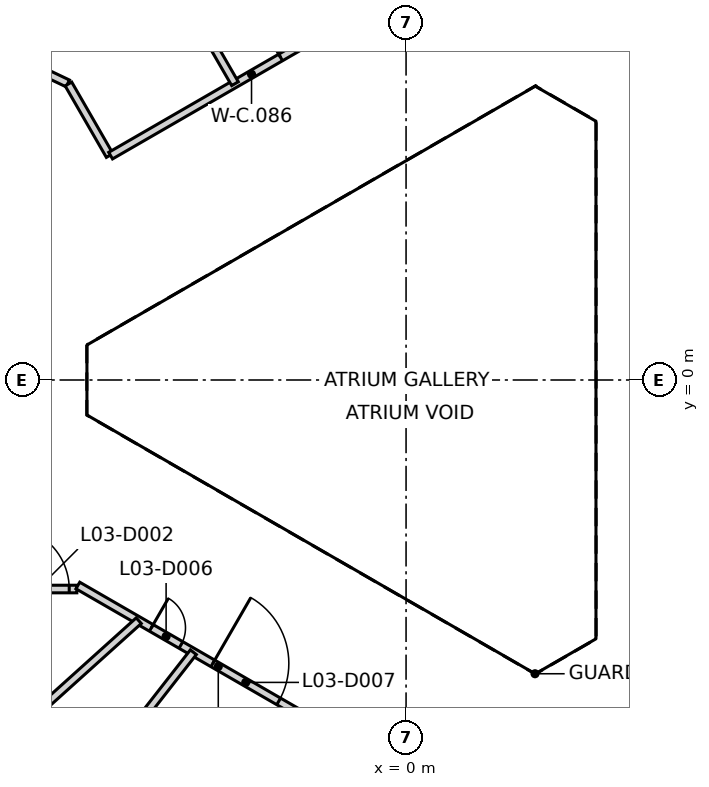
"""IFC4 building model, lengths in metres.
Left out: names, types, materials, properties, quantities, classifications, styles, units other than length and angle.
Written with IfcOpenShell. Run it as: python <this file> out.ifc"""

import sys

from ifc_helpers import new_model, si_unit, direction, frame, frame_2d, origin, place, context, subcontext, project, spatial, rectangle, extrude, element, fill, save


model = new_model("IFC4")
c1 = context("Model", 3, precision=1e-05, world=origin(), true_north=direction((0.0, 1.0)))
c2 = subcontext(c1, "Body", "Model", "MODEL_VIEW")
j1 = project(units=[si_unit("LENGTHUNIT", "METRE"), si_unit("PLANEANGLEUNIT", "RADIAN")], contexts=[c1])
p1 = place(None, origin())
s1 = spatial("IfcSite", under=j1, at=p1, CompositionType="ELEMENT")
p2 = place(p1, origin())
s2 = spatial("IfcBuilding", under=s1, at=p2, CompositionType="ELEMENT")
p3 = place(p2, frame((0.0, 0.0, 19.5)))
s3 = spatial("IfcBuildingStorey", under=s2, at=p3, CompositionType="ELEMENT", Elevation=19.5)
p4 = place(p3, frame((10.42, 6.498, 0.0), z_axis=(0.0, 0.0, 1.0), x_axis=(-0.866021906294, 0.500006057782, 0.0)))
e1 = element("IfcWall", 1, at=p4, inside=s3, PredefinedType="SHEAR", context=c2, shape_type="SweptSolid", body=[
    extrude(rectangle(XDim=11.55, YDim=0.25, at=frame_2d((5.775, 0.0))), origin(), (0.0, 0.0, 1.0), 4.55),
])
p5 = place(p4, frame((10.025, 0.0, 0.0)))
e2 = element("IfcOpeningElement", 2, at=p5, cuts=e1, PredefinedType="OPENING", context=c2, shape_type="SweptSolid", body=[
    extrude(rectangle(XDim=1.2, YDim=2.1, at=frame_2d((0.6, 1.05))), frame((0.0, 0.135, 0.0), z_axis=(0.0, -1.0, 0.0), x_axis=(1.0, 0.0, 0.0)), (0.0, 0.0, 1.0), 0.27),
])
p6 = place(p4, frame((8.725, 0.0, 0.0)))
e3 = element("IfcOpeningElement", 3, at=p6, cuts=e1, PredefinedType="OPENING", context=c2, shape_type="SweptSolid", body=[
    extrude(rectangle(XDim=1.2, YDim=2.1, at=frame_2d((0.6, 1.05))), frame((0.0, 0.135, 0.0), z_axis=(0.0, -1.0, 0.0), x_axis=(1.0, 0.0, 0.0)), (0.0, 0.0, 1.0), 0.27),
])
p7 = place(p3, frame((0.417, -12.273, 0.0), z_axis=(0.0, 0.0, 1.0), x_axis=(0.866021906294, 0.500006057782, 0.0)))
e4 = element("IfcWall", 4, at=p7, inside=s3, PredefinedType="SHEAR", context=c2, shape_type="SweptSolid", body=[
    extrude(rectangle(XDim=11.55, YDim=0.25, at=frame_2d((5.775, 0.0))), origin(), (0.0, 0.0, 1.0), 4.55),
])
p8 = place(p7, frame((10.025, 0.0, 0.0)))
e5 = element("IfcOpeningElement", 5, at=p8, cuts=e4, PredefinedType="OPENING", context=c2, shape_type="SweptSolid", body=[
    extrude(rectangle(XDim=1.2, YDim=2.1, at=frame_2d((0.6, 1.05))), frame((0.0, 0.135, 0.0), z_axis=(0.0, -1.0, 0.0), x_axis=(1.0, 0.0, 0.0)), (0.0, 0.0, 1.0), 0.27),
])
p9 = place(p7, frame((8.725, 0.0, 0.0)))
e6 = element("IfcOpeningElement", 6, at=p9, cuts=e4, PredefinedType="OPENING", context=c2, shape_type="SweptSolid", body=[
    extrude(rectangle(XDim=1.2, YDim=2.1, at=frame_2d((0.6, 1.05))), frame((0.0, 0.135, 0.0), z_axis=(0.0, -1.0, 0.0), x_axis=(1.0, 0.0, 0.0)), (0.0, 0.0, 1.0), 0.27),
])
p10 = place(p3, frame((-10.652, -5.5, 0.0), z_axis=(0.0, 0.0, 1.0), x_axis=(1.0, 0.0, 0.0)))
e7 = element("IfcWall", 7, at=p10, inside=s3, PredefinedType="PARTITIONING", context=c2, shape_type="SweptSolid", body=[
    extrude(rectangle(XDim=1.989, YDim=0.2, at=frame_2d((0.995, 0.0))), origin(), (0.0, 0.0, 1.0), 4.55),
])
p11 = place(p10, frame((0.139, 0.0, 0.0)))
e8 = element("IfcOpeningElement", 8, at=p11, cuts=e7, PredefinedType="OPENING", context=c2, shape_type="SweptSolid", body=[
    extrude(rectangle(XDim=1.65, YDim=2.1, at=frame_2d((0.825, 1.05))), frame((0.0, 0.11, 0.0), z_axis=(0.0, -1.0, 0.0), x_axis=(1.0, 0.0, 0.0)), (0.0, 0.0, 1.0), 0.22),
])
p12 = place(p3, frame((-10.082, 8.365, 0.0), z_axis=(0.0, 0.0, 1.0), x_axis=(0.903129261813, -0.429368765116, 0.0)))
e9 = element("IfcWall", 9, at=p12, inside=s3, PredefinedType="PARTITIONING", context=c2, shape_type="SweptSolid", body=[
    extrude(rectangle(XDim=1.309, YDim=0.2, at=frame_2d((0.654, 0.0))), origin(), (0.0, 0.0, 1.0), 4.55),
])
p13 = place(p3, frame((-8.884, 7.789, 0.0), z_axis=(0.0, 0.0, 1.0), x_axis=(0.49942731159, -0.866355793215, 0.0)))
e10 = element("IfcWall", 10, at=p13, inside=s3, PredefinedType="PARTITIONING", context=c2, shape_type="SweptSolid", body=[
    extrude(rectangle(XDim=2.172, YDim=0.2, at=frame_2d((1.086, 0.0))), origin(), (0.0, 0.0, 1.0), 4.55),
])
p14 = place(p3, frame((-8.636, -5.407, 0.0), z_axis=(0.0, 0.0, 1.0), x_axis=(0.86608314541, -0.499899975231, 0.0)))
e11 = element("IfcWall", 11, at=p14, inside=s3, PredefinedType="PARTITIONING", context=c2, shape_type="SweptSolid", body=[
    extrude(rectangle(XDim=8.532, YDim=0.2, at=frame_2d((4.266, 0.0))), origin(), (0.0, 0.0, 1.0), 4.55),
])
p15 = place(p14, frame((2.231, 0.0, 0.0)))
e12 = element("IfcOpeningElement", 12, at=p15, cuts=e11, PredefinedType="OPENING", context=c2, shape_type="SweptSolid", body=[
    extrude(rectangle(XDim=0.9, YDim=2.1, at=frame_2d((0.45, 1.05))), frame((0.0, 0.11, 0.0), z_axis=(0.0, -1.0, 0.0), x_axis=(1.0, 0.0, 0.0)), (0.0, 0.0, 1.0), 0.22),
])
p16 = place(p14, frame((4.101, 0.0, 0.0)))
e13 = element("IfcOpeningElement", 13, at=p16, cuts=e11, PredefinedType="OPENING", context=c2, shape_type="SweptSolid", body=[
    extrude(rectangle(XDim=2.0, YDim=2.1, at=frame_2d((1.0, 1.05))), frame((0.0, 0.11, 0.0), z_axis=(0.0, -1.0, 0.0), x_axis=(1.0, 0.0, 0.0)), (0.0, 0.0, 1.0), 0.22),
])
p17 = place(p3, frame((-7.774, 5.903, 0.0), z_axis=(0.0, 0.0, 1.0), x_axis=(0.865984718775, 0.500070461884, 0.0)))
e14 = element("IfcWall", 14, at=p17, inside=s3, PredefinedType="PARTITIONING", context=c2, shape_type="SweptSolid", body=[
    extrude(rectangle(XDim=8.562, YDim=0.2, at=frame_2d((4.281, 0.0))), origin(), (0.0, 0.0, 1.0), 4.55),
])
p18 = place(p17, frame((5.165, 0.0, 0.0)))
e15 = element("IfcOpeningElement", 15, at=p18, cuts=e14, PredefinedType="OPENING", context=c2, shape_type="SweptSolid", body=[
    extrude(rectangle(XDim=2.0, YDim=2.1, at=frame_2d((1.0, 1.05))), frame((0.0, 0.11, 0.0), z_axis=(0.0, -1.0, 0.0), x_axis=(1.0, 0.0, 0.0)), (0.0, 0.0, 1.0), 0.22),
])
p19 = place(p3, frame((-21.094, -18.993, 0.0), z_axis=(0.0, 0.0, 1.0), x_axis=(0.743122161884, 0.669155775972, 0.0)))
e16 = element("IfcWall", 16, at=p19, inside=s3, PredefinedType="PARTITIONING", context=c2, shape_type="SweptSolid", body=[
    extrude(rectangle(XDim=18.92, YDim=0.2, at=frame_2d((9.46, 0.0))), origin(), (0.0, 0.0, 1.0), 2.15),
])
p20 = place(p3, frame((-16.783, -21.481, 0.0), z_axis=(0.0, 0.0, 1.0), x_axis=(0.615637784037, 0.788029262696, 0.0)))
e17 = element("IfcWall", 17, at=p20, inside=s3, PredefinedType="PARTITIONING", context=c2, shape_type="SweptSolid", body=[
    extrude(rectangle(XDim=18.17, YDim=0.2, at=frame_2d((9.085, 0.0))), origin(), (0.0, 0.0, 1.0), 2.15),
])
p21 = place(p3, frame((-13.498, 23.378, 0.0), z_axis=(0.0, 0.0, 1.0), x_axis=(0.500000424546, -0.866025158672, 0.0)))
e18 = element("IfcWall", 18, at=p21, inside=s3, PredefinedType="PARTITIONING", context=c2, shape_type="SweptSolid", body=[
    extrude(rectangle(XDim=17.993, YDim=0.2, at=frame_2d((8.997, 0.0))), origin(), (0.0, 0.0, 1.0), 2.15),
])
p22 = place(p11, origin())
e19 = element("IfcDoor", 19, at=p22, inside=s3, OperationType="DOUBLE_DOOR_SINGLE_SWING", PredefinedType="DOOR", context=c2, shape_type="SweptSolid", body=[
    extrude(rectangle(XDim=1.65, YDim=2.1, at=frame_2d((0.825, 1.05))), frame((0.0, 0.025, 0.0), z_axis=(0.0, -1.0, 0.0), x_axis=(1.0, 0.0, 0.0)), (0.0, 0.0, 1.0), 0.05),
])
fill(e8, e19)
p23 = place(p18, origin())
e20 = element("IfcDoor", 20, at=p23, inside=s3, OperationType="DOUBLE_DOOR_SINGLE_SWING", PredefinedType="DOOR", context=c2, shape_type="SweptSolid", body=[
    extrude(rectangle(XDim=2.0, YDim=2.1, at=frame_2d((1.0, 1.05))), frame((0.0, 0.025, 0.0), z_axis=(0.0, -1.0, 0.0), x_axis=(1.0, 0.0, 0.0)), (0.0, 0.0, 1.0), 0.05),
])
fill(e15, e20)
p24 = place(p15, frame((0.9, 0.0, 0.0), z_axis=(0.0, 0.0, 1.0), x_axis=(-1.0, 0.0, 0.0)))
e21 = element("IfcDoor", 21, at=p24, inside=s3, OperationType="SINGLE_SWING_LEFT", PredefinedType="DOOR", context=c2, shape_type="SweptSolid", body=[
    extrude(rectangle(XDim=0.9, YDim=2.1, at=frame_2d((0.45, 1.05))), frame((0.0, 0.025, 0.0), z_axis=(0.0, -1.0, 0.0), x_axis=(1.0, 0.0, 0.0)), (0.0, 0.0, 1.0), 0.05),
])
fill(e12, e21)
p25 = place(p16, frame((2.0, 0.0, 0.0), z_axis=(0.0, 0.0, 1.0), x_axis=(-1.0, 0.0, 0.0)))
e22 = element("IfcDoor", 22, at=p25, inside=s3, OperationType="DOUBLE_DOOR_SINGLE_SWING", PredefinedType="DOOR", context=c2, shape_type="SweptSolid", body=[
    extrude(rectangle(XDim=2.0, YDim=2.1, at=frame_2d((1.0, 1.05))), frame((0.0, 0.025, 0.0), z_axis=(0.0, -1.0, 0.0), x_axis=(1.0, 0.0, 0.0)), (0.0, 0.0, 1.0), 0.05),
])
fill(e13, e22)
save(model, sys.argv[1])
